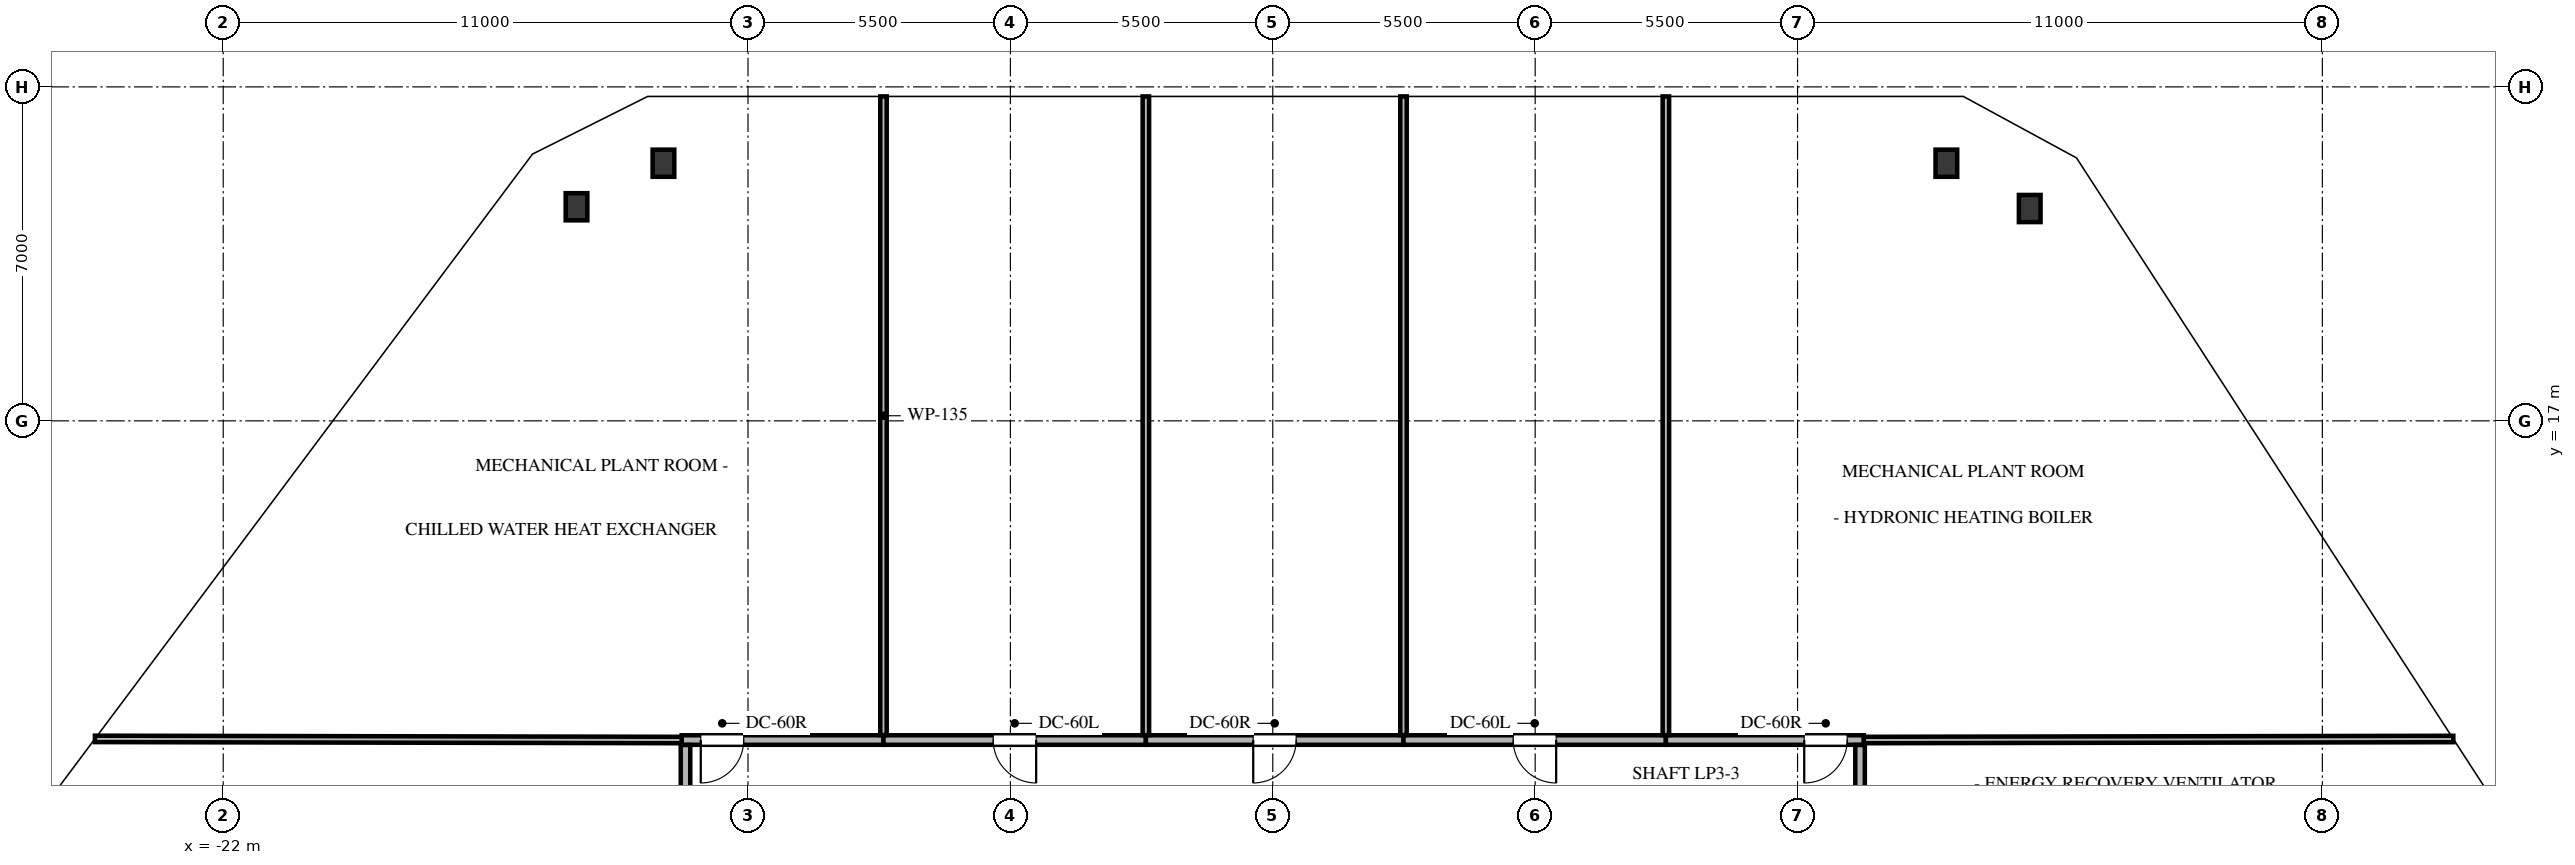
"""IFC4 building model, lengths in metres.
Left out: names, types, materials, properties, quantities, classifications, styles, units other than length and angle.
Written with IfcOpenShell. Run it as: python <this file> out.ifc"""

import sys

from ifc_helpers import new_model, si_unit, direction, frame, frame_2d, origin, origin_2d, place, context, subcontext, project, spatial, rectangle, i_section, extrude, source, transform, mapped, element, fill, save


model = new_model("IFC4")
c1 = context("Model", 3, precision=1e-05, world=origin(), true_north=direction((0.0, 1.0)))
c2 = subcontext(c1, "Body", "Model", "MODEL_VIEW")
j1 = project(units=[si_unit("LENGTHUNIT", "METRE"), si_unit("PLANEANGLEUNIT", "RADIAN")], contexts=[c1])
p1 = place(None, origin())
s1 = spatial("IfcSite", under=j1, at=p1, CompositionType="ELEMENT")
p2 = place(p1, origin())
s2 = spatial("IfcBuilding", under=s1, at=p2, CompositionType="ELEMENT")
p3 = place(p2, frame((0.0, 0.0, 10.4)))
s3 = spatial("IfcBuildingStorey", under=s2, at=p3, CompositionType="ELEMENT", Elevation=10.4)
m1 = source(origin(), c2, "Body", "SweptSolid", [
    extrude(i_section(OverallWidth=0.454, OverallDepth=0.569, WebThickness=0.078, FlangeThickness=0.125, FilletRadius=0.031, at=origin_2d()), origin(), (0.0, 0.0, 1.0), 5.23),
])
for number, where, z_axis, x_axis in (
    (1, (-14.594, 21.488, -0.35), (0.0, 0.0, 1.0), (1.0, 0.0, 0.0)),
    (2, (-12.772, 22.4, -0.35), (0.0, 0.0, 1.0), (1.0, 0.0, 0.0)),
    (3, (14.119, 22.4, -0.35), (0.0, 0.0, 1.0), (1.0, 0.0, 0.0)),
    (4, (15.866, 21.451, -0.35), (0.0, 0.0, 1.0), (1.0, 0.0, 0.0)),
):
    element("IfcColumn", number, at=place(p3, frame(where, z_axis=z_axis, x_axis=x_axis)), inside=s3, PredefinedType="COLUMN", context=c2, shape_type="MappedRepresentation", body=[
        mapped(m1, transform((0.0, 0.0, 0.0), x_axis=(1.0, 0.0, 0.0), y_axis=(0.0, 1.0, 0.0), z_axis=(0.0, 0.0, 1.0), scale=1.0)),
    ])
p4 = place(p3, frame((-8.16, 10.31, 0.0), z_axis=(0.0, 0.0, 1.0), x_axis=(-1.0, 0.0, 0.0)))
e5 = element("IfcWall", 5, at=p4, inside=s3, PredefinedType="SOLIDWALL", context=c2, shape_type="SweptSolid", body=[
    extrude(rectangle(XDim=4.23, YDim=0.2, at=frame_2d((2.115, 0.0))), origin(), (0.0, 0.0, 1.0), 3.787),
])
p5 = place(p4, frame((2.93, 0.0, 0.0)))
e6 = element("IfcOpeningElement", 6, at=p5, cuts=e5, PredefinedType="OPENING", context=c2, shape_type="SweptSolid", body=[
    extrude(rectangle(XDim=0.9, YDim=2.05, at=frame_2d((0.45, 1.025))), frame((0.0, 0.11, 0.0), z_axis=(0.0, -1.0, 0.0), x_axis=(1.0, 0.0, 0.0)), (0.0, 0.0, 1.0), 0.22),
])
p6 = place(p3, frame((-2.66, 10.31, 0.0), z_axis=(0.0, 0.0, 1.0), x_axis=(-1.0, 0.0, 0.0)))
e7 = element("IfcWall", 7, at=p6, inside=s3, PredefinedType="SOLIDWALL", context=c2, shape_type="SweptSolid", body=[
    extrude(rectangle(XDim=5.5, YDim=0.2, at=frame_2d((2.75, 0.0))), origin(), (0.0, 0.0, 1.0), 4.418),
])
p7 = place(p6, frame((2.3, 0.0, 0.0)))
e8 = element("IfcOpeningElement", 8, at=p7, cuts=e7, PredefinedType="OPENING", context=c2, shape_type="SweptSolid", body=[
    extrude(rectangle(XDim=0.9, YDim=2.05, at=frame_2d((0.45, 1.025))), frame((0.0, 0.11, 0.0), z_axis=(0.0, -1.0, 0.0), x_axis=(1.0, 0.0, 0.0)), (0.0, 0.0, 1.0), 0.22),
])
p8 = place(p3, frame((2.74, 10.31, 0.0), z_axis=(0.0, 0.0, 1.0), x_axis=(-1.0, 0.0, 0.0)))
e9 = element("IfcWall", 9, at=p8, inside=s3, PredefinedType="SOLIDWALL", context=c2, shape_type="SweptSolid", body=[
    extrude(rectangle(XDim=5.4, YDim=0.2, at=frame_2d((2.7, 0.0))), origin(), (0.0, 0.0, 1.0), 4.418),
])
p9 = place(p8, frame((2.25, 0.0, 0.0)))
e10 = element("IfcOpeningElement", 10, at=p9, cuts=e9, PredefinedType="OPENING", context=c2, shape_type="SweptSolid", body=[
    extrude(rectangle(XDim=0.9, YDim=2.05, at=frame_2d((0.45, 1.025))), frame((0.0, 0.11, 0.0), z_axis=(0.0, -1.0, 0.0), x_axis=(1.0, 0.0, 0.0)), (0.0, 0.0, 1.0), 0.22),
])
p10 = place(p3, frame((8.24, 10.31, 0.0), z_axis=(0.0, 0.0, 1.0), x_axis=(-1.0, 0.0, 0.0)))
e11 = element("IfcWall", 11, at=p10, inside=s3, PredefinedType="SOLIDWALL", context=c2, shape_type="SweptSolid", body=[
    extrude(rectangle(XDim=5.5, YDim=0.2, at=frame_2d((2.75, 0.0))), origin(), (0.0, 0.0, 1.0), 4.418),
])
p11 = place(p10, frame((2.3, 0.0, 0.0)))
e12 = element("IfcOpeningElement", 12, at=p11, cuts=e11, PredefinedType="OPENING", context=c2, shape_type="SweptSolid", body=[
    extrude(rectangle(XDim=0.9, YDim=2.05, at=frame_2d((0.45, 1.025))), frame((0.0, 0.11, 0.0), z_axis=(0.0, -1.0, 0.0), x_axis=(1.0, 0.0, 0.0)), (0.0, 0.0, 1.0), 0.22),
])
p12 = place(p3, frame((12.39, 10.31, 0.0), z_axis=(0.0, 0.0, 1.0), x_axis=(-1.0, 0.0, 0.0)))
e13 = element("IfcWall", 13, at=p12, inside=s3, PredefinedType="SOLIDWALL", context=c2, shape_type="SweptSolid", body=[
    extrude(rectangle(XDim=4.15, YDim=0.2, at=frame_2d((2.075, 0.0))), origin(), (0.0, 0.0, 1.0), 3.787),
])
p13 = place(p12, frame((0.35, 0.0, 0.0)))
e14 = element("IfcOpeningElement", 14, at=p13, cuts=e13, PredefinedType="OPENING", context=c2, shape_type="SweptSolid", body=[
    extrude(rectangle(XDim=0.9, YDim=2.05, at=frame_2d((0.45, 1.025))), frame((0.0, 0.11, 0.0), z_axis=(0.0, -1.0, 0.0), x_axis=(1.0, 0.0, 0.0)), (0.0, 0.0, 1.0), 0.22),
])
p14 = place(p3, frame((12.31, 3.49, 0.0), z_axis=(0.0, 0.0, 1.0), x_axis=(0.0, 1.0, 0.0)))
e15 = element("IfcWall", 15, at=p14, inside=s3, PredefinedType="SOLIDWALL", context=c2, shape_type="SweptSolid", body=[
    extrude(rectangle(XDim=6.716, YDim=0.2, at=frame_2d((3.358, 0.0))), origin(), (0.0, 0.0, 1.0), 4.865),
])
p15 = place(p14, frame((0.35, 0.0, 0.0)))
e16 = element("IfcOpeningElement", 16, at=p15, cuts=e15, PredefinedType="OPENING", context=c2, shape_type="SweptSolid", body=[
    extrude(rectangle(XDim=0.9, YDim=2.05, at=frame_2d((0.45, 1.025))), frame((0.0, 0.11, 0.0), z_axis=(0.0, -1.0, 0.0), x_axis=(1.0, 0.0, 0.0)), (0.0, 0.0, 1.0), 0.22),
])
p16 = place(p3, frame((-12.31, 10.206, 0.0), z_axis=(0.0, 0.0, 1.0), x_axis=(0.0, -1.0, 0.0)))
e17 = element("IfcWall", 17, at=p16, inside=s3, PredefinedType="SOLIDWALL", context=c2, shape_type="SweptSolid", body=[
    extrude(rectangle(XDim=9.446, YDim=0.2, at=frame_2d((4.723, 0.0))), origin(), (0.0, 0.0, 1.0), 3.787),
])
p17 = place(p16, frame((4.273, 0.0, 0.0)))
e18 = element("IfcOpeningElement", 18, at=p17, cuts=e17, PredefinedType="OPENING", context=c2, shape_type="SweptSolid", body=[
    extrude(rectangle(XDim=0.9, YDim=2.05, at=frame_2d((0.45, 1.025))), frame((0.0, 0.11, 0.0), z_axis=(0.0, -1.0, 0.0), x_axis=(1.0, 0.0, 0.0)), (0.0, 0.0, 1.0), 0.22),
])
p18 = place(p3, frame((-8.16, 23.8, 0.0), z_axis=(0.0, 0.0, 1.0), x_axis=(0.0, -1.0, 0.0)))
e19 = element("IfcWall", 19, at=p18, inside=s3, PredefinedType="PARTITIONING", context=c2, shape_type="SweptSolid", body=[
    extrude(rectangle(XDim=13.386, YDim=0.135, at=frame_2d((6.693, 0.0))), origin(), (0.0, 0.0, 1.0), 4.174),
])
p19 = place(p3, frame((-12.39, 10.31, 0.0), z_axis=(0.0, 0.0, 1.0), x_axis=(-0.999998146559, 0.001925325425, 0.0)))
e20 = element("IfcWall", 20, at=p19, inside=s3, PredefinedType="PARTITIONING", context=c2, shape_type="SweptSolid", body=[
    extrude(rectangle(XDim=12.3, YDim=0.135, at=frame_2d((6.15, 0.0))), origin(), (0.0, 0.0, 1.0), 4.174),
])
for number, where, z_axis, x_axis in (
    (21, (-2.66, 23.8, 0.0), (0.0, 0.0, 1.0), (0.0, -1.0, 0.0)),
    (22, (2.74, 23.8, 0.0), (0.0, 0.0, 1.0), (0.0, -1.0, 0.0)),
    (23, (8.24, 23.8, 0.0), (0.0, 0.0, 1.0), (0.0, -1.0, 0.0)),
):
    element("IfcWall", number, at=place(p3, frame(where, z_axis=z_axis, x_axis=x_axis)), inside=s3, PredefinedType="PARTITIONING", context=c2, shape_type="SweptSolid", body=[
        extrude(rectangle(XDim=13.386, YDim=0.135, at=frame_2d((6.693, 0.0))), origin(), (0.0, 0.0, 1.0), 4.174),
    ])
p20 = place(p3, frame((24.746, 10.332, 0.0), z_axis=(0.0, 0.0, 1.0), x_axis=(-0.999998453823, -0.001758508277, 0.0)))
e24 = element("IfcWall", 24, at=p20, inside=s3, PredefinedType="PARTITIONING", context=c2, shape_type="SweptSolid", body=[
    extrude(rectangle(XDim=12.356, YDim=0.135, at=frame_2d((6.178, 0.0))), origin(), (0.0, 0.0, 1.0), 4.174),
])
m2 = source(origin(), c2, "Body", "SweptSolid", [
    extrude(rectangle(XDim=0.9, YDim=2.05, at=frame_2d((0.45, 1.025))), frame((0.0, 0.025, 0.0), z_axis=(0.0, -1.0, 0.0), x_axis=(1.0, 0.0, 0.0)), (0.0, 0.0, 1.0), 0.05),
])
p21 = place(p5, origin())
e25 = element("IfcDoor", 25, at=p21, inside=s3, OperationType="SINGLE_SWING_RIGHT", PredefinedType="DOOR", context=c2, shape_type="MappedRepresentation", body=[
    mapped(m2, transform((0.0, 0.0, 0.0), x_axis=(1.0, 0.0, 0.0), y_axis=(0.0, 1.0, 0.0), z_axis=(0.0, 0.0, 1.0), scale=1.0)),
])
fill(e6, e25)
m3 = source(origin(), c2, "Body", "SweptSolid", [
    extrude(rectangle(XDim=0.9, YDim=2.05, at=frame_2d((0.45, 1.025))), frame((0.0, 0.025, 0.0), z_axis=(0.0, -1.0, 0.0), x_axis=(1.0, 0.0, 0.0)), (0.0, 0.0, 1.0), 0.05),
])
p22 = place(p7, origin())
e26 = element("IfcDoor", 26, at=p22, inside=s3, OperationType="SINGLE_SWING_LEFT", PredefinedType="DOOR", context=c2, shape_type="MappedRepresentation", body=[
    mapped(m3, transform((0.0, 0.0, 0.0), x_axis=(1.0, 0.0, 0.0), y_axis=(0.0, 1.0, 0.0), z_axis=(0.0, 0.0, 1.0), scale=1.0)),
])
fill(e8, e26)
p23 = place(p9, origin())
e27 = element("IfcDoor", 27, at=p23, inside=s3, OperationType="SINGLE_SWING_RIGHT", PredefinedType="DOOR", context=c2, shape_type="MappedRepresentation", body=[
    mapped(m2, transform((0.0, 0.0, 0.0), x_axis=(1.0, 0.0, 0.0), y_axis=(0.0, 1.0, 0.0), z_axis=(0.0, 0.0, 1.0), scale=1.0)),
])
fill(e10, e27)
p24 = place(p11, origin())
e28 = element("IfcDoor", 28, at=p24, inside=s3, OperationType="SINGLE_SWING_LEFT", PredefinedType="DOOR", context=c2, shape_type="MappedRepresentation", body=[
    mapped(m3, transform((0.0, 0.0, 0.0), x_axis=(1.0, 0.0, 0.0), y_axis=(0.0, 1.0, 0.0), z_axis=(0.0, 0.0, 1.0), scale=1.0)),
])
fill(e12, e28)
p25 = place(p13, origin())
e29 = element("IfcDoor", 29, at=p25, inside=s3, OperationType="SINGLE_SWING_RIGHT", PredefinedType="DOOR", context=c2, shape_type="MappedRepresentation", body=[
    mapped(m2, transform((0.0, 0.0, 0.0), x_axis=(1.0, 0.0, 0.0), y_axis=(0.0, 1.0, 0.0), z_axis=(0.0, 0.0, 1.0), scale=1.0)),
])
fill(e14, e29)
save(model, sys.argv[1])
